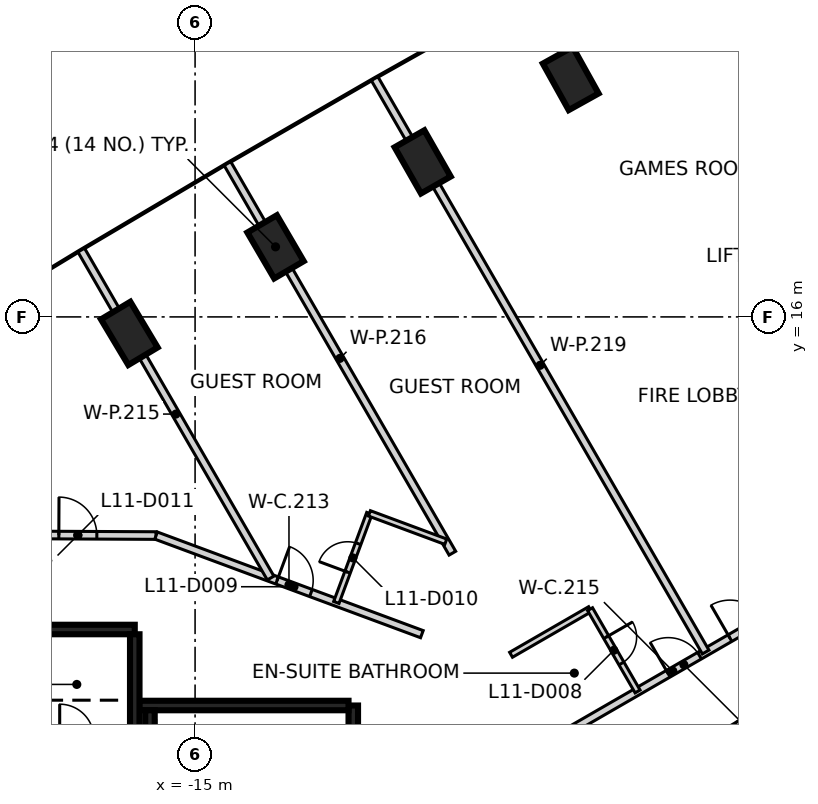
"""IFC4 building model, lengths in metres.
Left out: names, types, materials, properties, quantities, classifications, styles, units other than length and angle.
Written with IfcOpenShell. Run it as: python <this file> out.ifc"""

import sys

from ifc_helpers import new_model, si_unit, direction, frame, frame_2d, origin, origin_2d, place, context, subcontext, project, spatial, rectangle, extrude, element, fill, save


model = new_model("IFC4")
c1 = context("Model", 3, precision=1e-05, world=origin(), true_north=direction((0.0, 1.0)))
c2 = subcontext(c1, "Body", "Model", "MODEL_VIEW")
j1 = project(units=[si_unit("LENGTHUNIT", "METRE"), si_unit("PLANEANGLEUNIT", "RADIAN")], contexts=[c1])
p1 = place(None, origin())
s1 = spatial("IfcSite", under=j1, at=p1, CompositionType="ELEMENT")
p2 = place(p1, origin())
s2 = spatial("IfcBuilding", under=s1, at=p2, CompositionType="ELEMENT")
p3 = place(p2, frame((0.0, 0.0, 53.0)))
s3 = spatial("IfcBuildingStorey", under=s2, at=p3, CompositionType="ELEMENT", Elevation=53.0)
for number, where, z_axis, x_axis in (
    (1, (-5.116, 22.272, -0.475), (0.0, 0.0, 1.0), (-0.486, 0.874, 0.0)),
    (2, (-9.011, 20.079, -0.475), (0.0, 0.0, 1.0), (-0.495, 0.869, 0.0)),
    (3, (-12.883, 17.844, -0.475), (0.0, 0.0, 1.0), (-0.505, 0.863, 0.0)),
    (4, (-16.73, 15.566, -0.475), (0.0, 0.0, 1.0), (-0.514, 0.858, 0.0)),
):
    element("IfcColumn", number, at=place(p3, frame(where, z_axis=z_axis, x_axis=x_axis)), inside=s3, PredefinedType="COLUMN", context=c2, shape_type="SweptSolid", body=[
        extrude(rectangle(XDim=1.4, YDim=0.9, at=origin_2d()), origin(), (0.0, 0.0, 1.0), 3.6),
    ])
p4 = place(p3, frame((-10.837, 5.775, 0.0), z_axis=(0.0, 0.0, 1.0), x_axis=(0.0, -1.0, 0.0)))
e5 = element("IfcWall", 5, at=p4, inside=s3, PredefinedType="SHEAR", context=c2, shape_type="SweptSolid", body=[
    extrude(rectangle(XDim=11.55, YDim=0.25, at=frame_2d((5.775, 0.0))), origin(), (0.0, 0.0, 1.0), 3.125),
])
p5 = place(p4, frame((10.025, 0.0, 0.0)))
e6 = element("IfcOpeningElement", 6, at=p5, cuts=e5, PredefinedType="OPENING", context=c2, shape_type="SweptSolid", body=[
    extrude(rectangle(XDim=1.2, YDim=2.1, at=frame_2d((0.6, 1.05))), frame((0.0, 0.135, 0.0), z_axis=(0.0, -1.0, 0.0), x_axis=(1.0, 0.0, 0.0)), (0.0, 0.0, 1.0), 0.27),
])
p6 = place(p4, frame((8.725, 0.0, 0.0)))
e7 = element("IfcOpeningElement", 7, at=p6, cuts=e5, PredefinedType="OPENING", context=c2, shape_type="SweptSolid", body=[
    extrude(rectangle(XDim=1.2, YDim=2.1, at=frame_2d((0.6, 1.05))), frame((0.0, 0.135, 0.0), z_axis=(0.0, -1.0, 0.0), x_axis=(1.0, 0.0, 0.0)), (0.0, 0.0, 1.0), 0.27),
])
p7 = place(p3, frame((-16.472, 5.775, 0.0), z_axis=(0.0, 0.0, 1.0), x_axis=(1.0, 0.0, 0.0)))
e8 = element("IfcWall", 8, at=p7, inside=s3, PredefinedType="SHEAR", context=c2, shape_type="SweptSolid", body=[
    extrude(rectangle(XDim=5.51, YDim=0.25, at=frame_2d((2.755, 0.0))), origin(), (0.0, 0.0, 1.0), 3.125),
])
p8 = place(p3, frame((-19.637, 7.775, 0.0), z_axis=(0.0, 0.0, 1.0), x_axis=(1.0, 0.0, 0.0)))
e9 = element("IfcWall", 9, at=p8, inside=s3, PredefinedType="SHEAR", context=c2, shape_type="SweptSolid", body=[
    extrude(rectangle(XDim=3.05, YDim=0.25, at=frame_2d((1.525, 0.0))), origin(), (0.0, 0.0, 1.0), 3.125),
])
p9 = place(p3, frame((-16.587, 7.65, 0.0), z_axis=(0.0, 0.0, 1.0), x_axis=(0.0, -1.0, 0.0)))
e10 = element("IfcWall", 10, at=p9, inside=s3, PredefinedType="SHEAR", context=c2, shape_type="SweptSolid", body=[
    extrude(rectangle(XDim=2.865, YDim=0.25, at=frame_2d((1.432, 0.0))), origin(), (0.0, 0.0, 1.0), 3.125),
])
p10 = place(p3, frame((-16.187, 3.2, 0.0), z_axis=(0.0, 0.0, 1.0), x_axis=(0.0, 1.0, 0.0)))
e11 = element("IfcWall", 11, at=p10, inside=s3, PredefinedType="SHEAR", context=c2, shape_type="SweptSolid", body=[
    extrude(rectangle(XDim=2.449, YDim=0.25, at=frame_2d((1.225, 0.0))), origin(), (0.0, 0.0, 1.0), 3.125),
])
p11 = place(p3, frame((-20.143, 10.266, 0.0), z_axis=(0.0, 0.0, 1.0), x_axis=(0.999989297417, -0.004626559416, 0.0)))
e12 = element("IfcWall", 12, at=p11, inside=s3, PredefinedType="PARTITIONING", context=c2, shape_type="SweptSolid", body=[
    extrude(rectangle(XDim=4.116, YDim=0.2, at=frame_2d((2.058, 0.0))), origin(), (0.0, 0.0, 1.0), 3.125),
])
p12 = place(p11, frame((1.558, 0.0, 0.0)))
e13 = element("IfcOpeningElement", 13, at=p12, cuts=e12, PredefinedType="OPENING", context=c2, shape_type="SweptSolid", body=[
    extrude(rectangle(XDim=1.0, YDim=2.1, at=frame_2d((0.5, 1.05))), frame((0.0, 0.11, 0.0), z_axis=(0.0, -1.0, 0.0), x_axis=(1.0, 0.0, 0.0)), (0.0, 0.0, 1.0), 0.22),
])
p13 = place(p3, frame((-16.026, 10.246, 0.0), z_axis=(0.0, 0.0, 1.0), x_axis=(0.937598236139, -0.347720502112, 0.0)))
e14 = element("IfcWall", 14, at=p13, inside=s3, PredefinedType="PARTITIONING", context=c2, shape_type="SweptSolid", body=[
    extrude(rectangle(XDim=7.458, YDim=0.2, at=frame_2d((3.729, 0.0))), origin(), (0.0, 0.0, 1.0), 3.125),
])
p14 = place(p13, frame((3.396, 0.0, 0.0)))
e15 = element("IfcOpeningElement", 15, at=p14, cuts=e14, PredefinedType="OPENING", context=c2, shape_type="SweptSolid", body=[
    extrude(rectangle(XDim=0.95, YDim=2.1, at=frame_2d((0.475, 1.05))), frame((0.0, 0.11, 0.0), z_axis=(0.0, -1.0, 0.0), x_axis=(1.0, 0.0, 0.0)), (0.0, 0.0, 1.0), 0.22),
])
p15 = place(p3, frame((-5.446, 4.94, 0.0), z_axis=(0.0, 0.0, 1.0), x_axis=(0.866096332545, 0.499877127655, 0.0)))
e16 = element("IfcWall", 16, at=p15, inside=s3, PredefinedType="PARTITIONING", context=c2, shape_type="SweptSolid", body=[
    extrude(rectangle(XDim=6.969, YDim=0.2, at=frame_2d((3.484, 0.0))), origin(), (0.0, 0.0, 1.0), 3.125),
])
p16 = place(p15, frame((5.219, 0.0, 0.0)))
e17 = element("IfcOpeningElement", 17, at=p16, cuts=e16, PredefinedType="OPENING", context=c2, shape_type="SweptSolid", body=[
    extrude(rectangle(XDim=1.0, YDim=2.1, at=frame_2d((0.5, 1.05))), frame((0.0, 0.11, 0.0), z_axis=(0.0, -1.0, 0.0), x_axis=(1.0, 0.0, 0.0)), (0.0, 0.0, 1.0), 0.22),
])
p17 = place(p15, frame((3.344, 0.0, 0.0)))
e18 = element("IfcOpeningElement", 18, at=p17, cuts=e16, PredefinedType="OPENING", context=c2, shape_type="SweptSolid", body=[
    extrude(rectangle(XDim=0.95, YDim=2.1, at=frame_2d((0.475, 1.05))), frame((0.0, 0.11, 0.0), z_axis=(0.0, -1.0, 0.0), x_axis=(1.0, 0.0, 0.0)), (0.0, 0.0, 1.0), 0.22),
])
p18 = place(p3, frame((-17.996, 17.758, 0.0), z_axis=(0.0, 0.0, 1.0), x_axis=(0.500046945013, -0.865998298372, 0.0)))
e19 = element("IfcWall", 19, at=p18, inside=s3, PredefinedType="PARTITIONING", context=c2, shape_type="SweptSolid", body=[
    extrude(rectangle(XDim=9.964, YDim=0.2, at=frame_2d((4.982, 0.0))), origin(), (0.0, 0.0, 1.0), 3.125),
])
p19 = place(p3, frame((-14.149, 20.035, 0.0), z_axis=(0.0, 0.0, 1.0), x_axis=(0.500022967158, -0.866012143284, 0.0)))
e20 = element("IfcWall", 20, at=p19, inside=s3, PredefinedType="PARTITIONING", context=c2, shape_type="SweptSolid", body=[
    extrude(rectangle(XDim=11.838, YDim=0.2, at=frame_2d((5.919, 0.0))), origin(), (0.0, 0.0, 1.0), 3.125),
])
p20 = place(p3, frame((-10.276, 22.271, 0.0), z_axis=(0.0, 0.0, 1.0), x_axis=(0.499958184216, -0.866049544793, 0.0)))
e21 = element("IfcWall", 21, at=p20, inside=s3, PredefinedType="PARTITIONING", context=c2, shape_type="SweptSolid", body=[
    extrude(rectangle(XDim=17.422, YDim=0.2, at=frame_2d((8.711, 0.0))), origin(), (0.0, 0.0, 1.0), 3.125),
])
p21 = place(p3, frame((-11.283, 8.487, 0.0), z_axis=(0.0, 0.0, 1.0), x_axis=(0.347921729873, 0.937523583641, 0.0)))
e22 = element("IfcWall", 22, at=p21, inside=s3, PredefinedType="PARTITIONING", context=c2, shape_type="SweptSolid", body=[
    extrude(rectangle(XDim=2.5, YDim=0.15, at=frame_2d((1.25, 0.0))), origin(), (0.0, 0.0, 1.0), 3.125),
])
p22 = place(p21, frame((0.85, 0.0, 0.0)))
e23 = element("IfcOpeningElement", 23, at=p22, cuts=e22, PredefinedType="OPENING", context=c2, shape_type="SweptSolid", body=[
    extrude(rectangle(XDim=0.8, YDim=2.1, at=frame_2d((0.4, 1.05))), frame((0.0, 0.085, 0.0), z_axis=(0.0, -1.0, 0.0), x_axis=(1.0, 0.0, 0.0)), (0.0, 0.0, 1.0), 0.17),
])
p23 = place(p3, frame((-10.413, 10.831, 0.0), z_axis=(0.0, 0.0, 1.0), x_axis=(0.937443331153, -0.348137904971, 0.0)))
e24 = element("IfcWall", 24, at=p23, inside=s3, PredefinedType="PARTITIONING", context=c2, shape_type="SweptSolid", body=[
    extrude(rectangle(XDim=2.143, YDim=0.15, at=frame_2d((1.072, 0.0))), origin(), (0.0, 0.0, 1.0), 3.125),
])
p24 = place(p3, frame((-6.686, 7.11, 0.0), z_axis=(0.0, 0.0, 1.0), x_axis=(0.866100915363, 0.499869187296, 0.0)))
e25 = element("IfcWall", 25, at=p24, inside=s3, PredefinedType="PARTITIONING", context=c2, shape_type="SweptSolid", body=[
    extrude(rectangle(XDim=2.401, YDim=0.15, at=frame_2d((1.2, 0.0))), origin(), (0.0, 0.0, 1.0), 3.125),
])
p25 = place(p3, frame((-4.607, 8.31, 0.0), z_axis=(0.0, 0.0, 1.0), x_axis=(0.500004234368, -0.866022959057, 0.0)))
e26 = element("IfcWall", 26, at=p25, inside=s3, PredefinedType="PARTITIONING", context=c2, shape_type="SweptSolid", body=[
    extrude(rectangle(XDim=2.5, YDim=0.15, at=frame_2d((1.25, 0.0))), origin(), (0.0, 0.0, 1.0), 3.125),
])
p26 = place(p25, frame((0.85, 0.0, 0.0)))
e27 = element("IfcOpeningElement", 27, at=p26, cuts=e26, PredefinedType="OPENING", context=c2, shape_type="SweptSolid", body=[
    extrude(rectangle(XDim=0.8, YDim=2.1, at=frame_2d((0.4, 1.05))), frame((0.0, 0.085, 0.0), z_axis=(0.0, -1.0, 0.0), x_axis=(1.0, 0.0, 0.0)), (0.0, 0.0, 1.0), 0.17),
])
p27 = place(p16, origin())
e28 = element("IfcDoor", 28, at=p27, inside=s3, OperationType="SINGLE_SWING_LEFT", PredefinedType="DOOR", context=c2, shape_type="SweptSolid", body=[
    extrude(rectangle(XDim=1.0, YDim=2.1, at=frame_2d((0.5, 1.05))), frame((0.0, 0.025, 0.0), z_axis=(0.0, -1.0, 0.0), x_axis=(1.0, 0.0, 0.0)), (0.0, 0.0, 1.0), 0.05),
])
fill(e17, e28)
p28 = place(p17, origin())
e29 = element("IfcDoor", 29, at=p28, inside=s3, OperationType="SINGLE_SWING_LEFT", PredefinedType="DOOR", context=c2, shape_type="SweptSolid", body=[
    extrude(rectangle(XDim=0.95, YDim=2.1, at=frame_2d((0.475, 1.05))), frame((0.0, 0.025, 0.0), z_axis=(0.0, -1.0, 0.0), x_axis=(1.0, 0.0, 0.0)), (0.0, 0.0, 1.0), 0.05),
])
fill(e18, e29)
p29 = place(p26, frame((0.8, 0.0, 0.0), z_axis=(0.0, 0.0, 1.0), x_axis=(-1.0, 0.0, 0.0)))
e30 = element("IfcDoor", 30, at=p29, inside=s3, OperationType="SINGLE_SWING_LEFT", PredefinedType="DOOR", context=c2, shape_type="SweptSolid", body=[
    extrude(rectangle(XDim=0.8, YDim=2.1, at=frame_2d((0.4, 1.05))), frame((0.0, 0.025, 0.0), z_axis=(0.0, -1.0, 0.0), x_axis=(1.0, 0.0, 0.0)), (0.0, 0.0, 1.0), 0.05),
])
fill(e27, e30)
p30 = place(p14, origin())
e31 = element("IfcDoor", 31, at=p30, inside=s3, OperationType="SINGLE_SWING_LEFT", PredefinedType="DOOR", context=c2, shape_type="SweptSolid", body=[
    extrude(rectangle(XDim=0.95, YDim=2.1, at=frame_2d((0.475, 1.05))), frame((0.0, 0.025, 0.0), z_axis=(0.0, -1.0, 0.0), x_axis=(1.0, 0.0, 0.0)), (0.0, 0.0, 1.0), 0.05),
])
fill(e15, e31)
p31 = place(p22, origin())
e32 = element("IfcDoor", 32, at=p31, inside=s3, OperationType="SINGLE_SWING_LEFT", PredefinedType="DOOR", context=c2, shape_type="SweptSolid", body=[
    extrude(rectangle(XDim=0.8, YDim=2.1, at=frame_2d((0.4, 1.05))), frame((0.0, 0.025, 0.0), z_axis=(0.0, -1.0, 0.0), x_axis=(1.0, 0.0, 0.0)), (0.0, 0.0, 1.0), 0.05),
])
fill(e23, e32)
p32 = place(p12, frame((1.0, 0.0, 0.0), z_axis=(0.0, 0.0, 1.0), x_axis=(-1.0, 0.0, 0.0)))
e33 = element("IfcDoor", 33, at=p32, inside=s3, OperationType="SINGLE_SWING_LEFT", PredefinedType="DOOR", context=c2, shape_type="SweptSolid", body=[
    extrude(rectangle(XDim=1.0, YDim=2.1, at=frame_2d((0.5, 1.05))), frame((0.0, 0.025, 0.0), z_axis=(0.0, -1.0, 0.0), x_axis=(1.0, 0.0, 0.0)), (0.0, 0.0, 1.0), 0.05),
])
fill(e13, e33)
save(model, sys.argv[1])
